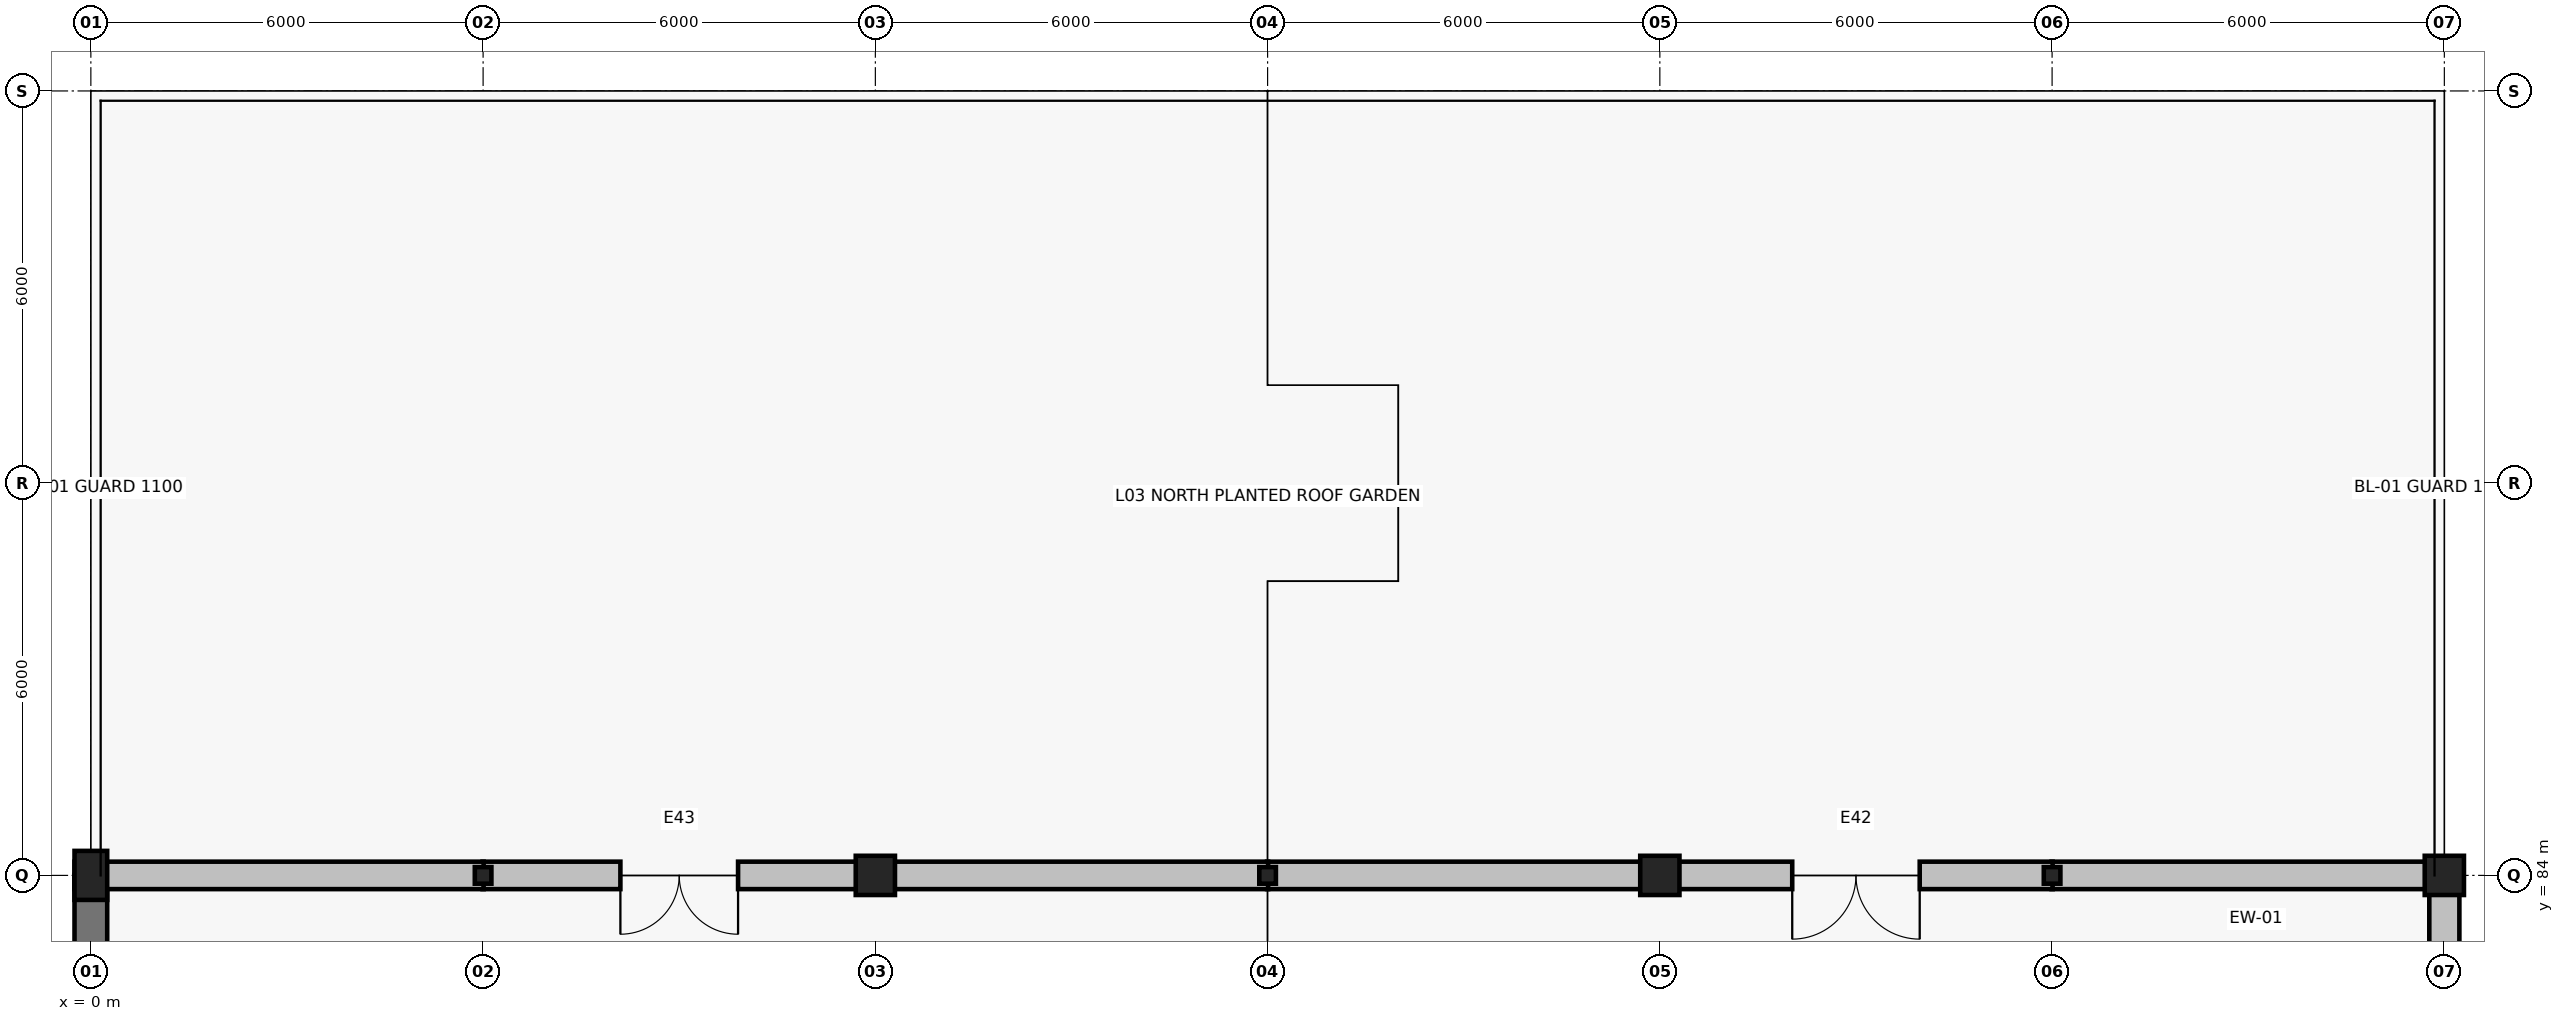
"""IFC4 building model, lengths in metres.
Left out: names, types, materials, properties, quantities, classifications, styles, units other than length and angle.
Written with IfcOpenShell. Run it as: python <this file> out.ifc"""

import sys

from ifc_helpers import new_model, si_unit, direction, frame, frame_2d, origin, origin_2d, place, context, subcontext, project, spatial, rectangle, hollow_rectangle, extrude, element, fill, save


model = new_model("IFC4")
c1 = context("Model", 3, precision=1e-05, world=origin(), true_north=direction((0.0, 1.0)))
c2 = subcontext(c1, "Body", "Model", "MODEL_VIEW")
j1 = project(units=[si_unit("LENGTHUNIT", "METRE"), si_unit("PLANEANGLEUNIT", "RADIAN")], contexts=[c1])
p1 = place(None, origin())
s1 = spatial("IfcSite", under=j1, at=p1, CompositionType="ELEMENT")
p2 = place(p1, origin())
s2 = spatial("IfcBuilding", under=s1, at=p2, CompositionType="ELEMENT")
p3 = place(p2, frame((0.0, 0.0, 11.4)))
s3 = spatial("IfcBuildingStorey", under=s2, at=p3, CompositionType="ELEMENT", Elevation=11.4)
p4 = place(p3, frame((0.0, 84.0, 0.0), z_axis=(0.0, 0.0, 1.0), x_axis=(1.0, 0.0, 0.0)))
e1 = element("IfcColumn", 1, at=p4, inside=s3, PredefinedType="PILASTER", context=c2, shape_type="SweptSolid", body=[
    extrude(rectangle(XDim=0.5, YDim=0.75, at=origin_2d()), origin(), (0.0, 0.0, 1.0), 4.0),
])
p5 = place(p3, frame((6.0, 84.0, 0.0), z_axis=(0.0, 0.0, 1.0), x_axis=(1.0, 0.0, 0.0)))
e2 = element("IfcColumn", 2, at=p5, inside=s3, PredefinedType="COLUMN", context=c2, shape_type="SweptSolid", body=[
    extrude(hollow_rectangle(XDim=0.254, YDim=0.254, WallThickness=0.01, InnerFilletRadius=0.01, OuterFilletRadius=0.019, at=origin_2d()), origin(), (0.0, 0.0, 1.0), 4.0),
])
p6 = place(p3, frame((12.0, 84.0, 0.0), z_axis=(0.0, 0.0, 1.0), x_axis=(1.0, 0.0, 0.0)))
e3 = element("IfcColumn", 3, at=p6, inside=s3, PredefinedType="COLUMN", context=c2, shape_type="SweptSolid", body=[
    extrude(rectangle(XDim=0.6, YDim=0.6, at=origin_2d()), origin(), (0.0, 0.0, 1.0), 4.0),
])
p7 = place(p3, frame((18.0, 84.0, 0.0), z_axis=(0.0, 0.0, 1.0), x_axis=(1.0, 0.0, 0.0)))
e4 = element("IfcColumn", 4, at=p7, inside=s3, PredefinedType="COLUMN", context=c2, shape_type="SweptSolid", body=[
    extrude(hollow_rectangle(XDim=0.254, YDim=0.254, WallThickness=0.01, InnerFilletRadius=0.01, OuterFilletRadius=0.019, at=origin_2d()), origin(), (0.0, 0.0, 1.0), 4.0),
])
p8 = place(p3, frame((24.0, 84.0, 0.0), z_axis=(0.0, 0.0, 1.0), x_axis=(1.0, 0.0, 0.0)))
e5 = element("IfcColumn", 5, at=p8, inside=s3, PredefinedType="COLUMN", context=c2, shape_type="SweptSolid", body=[
    extrude(rectangle(XDim=0.6, YDim=0.6, at=origin_2d()), origin(), (0.0, 0.0, 1.0), 4.0),
])
p9 = place(p3, frame((30.0, 84.0, 0.0), z_axis=(0.0, 0.0, 1.0), x_axis=(1.0, 0.0, 0.0)))
e6 = element("IfcColumn", 6, at=p9, inside=s3, PredefinedType="COLUMN", context=c2, shape_type="SweptSolid", body=[
    extrude(hollow_rectangle(XDim=0.254, YDim=0.254, WallThickness=0.01, InnerFilletRadius=0.01, OuterFilletRadius=0.019, at=origin_2d()), origin(), (0.0, 0.0, 1.0), 4.0),
])
p10 = place(p3, frame((36.0, 84.0, 0.0), z_axis=(0.0, 0.0, 1.0), x_axis=(1.0, 0.0, 0.0)))
e7 = element("IfcColumn", 7, at=p10, inside=s3, PredefinedType="COLUMN", context=c2, shape_type="SweptSolid", body=[
    extrude(rectangle(XDim=0.6, YDim=0.6, at=origin_2d()), origin(), (0.0, 0.0, 1.0), 4.0),
])
p11 = place(p3, frame((0.0, -0.008, 0.0), z_axis=(0.0, 0.0, 1.0), x_axis=(0.0, 1.0, 0.0)))
e8 = element("IfcWall", 8, at=p11, inside=s3, PredefinedType="SOLIDWALL", context=c2, shape_type="SweptSolid", body=[
    extrude(rectangle(XDim=84.016, YDim=0.5, at=frame_2d((42.008, 0.0))), origin(), (0.0, 0.0, 1.0), 3.68),
])
p12 = place(p3, frame((36.0, 73.58, 0.0), z_axis=(0.0, 0.0, 1.0), x_axis=(0.0, 1.0, 0.0)))
e9 = element("IfcWall", 9, at=p12, inside=s3, PredefinedType="SOLIDWALL", context=c2, shape_type="SweptSolid", body=[
    extrude(rectangle(XDim=10.428, YDim=0.46, at=frame_2d((5.214, 0.0))), origin(), (0.0, 0.0, 1.0), 2.957),
])
p13 = place(p3, frame((36.25, 84.0, 0.0), z_axis=(0.0, 0.0, 1.0), x_axis=(-1.0, 0.0, 0.0)))
e10 = element("IfcWall", 10, at=p13, inside=s3, PredefinedType="SOLIDWALL", context=c2, shape_type="SweptSolid", body=[
    extrude(rectangle(XDim=6.258, YDim=0.42, at=frame_2d((3.129, 0.0))), origin(), (0.0, 0.0, 1.0), 2.957),
])
p14 = place(p3, frame((30.008, 84.0, 0.0), z_axis=(0.0, 0.0, 1.0), x_axis=(-1.0, 0.0, 0.0)))
e11 = element("IfcWall", 11, at=p14, inside=s3, PredefinedType="SOLIDWALL", context=c2, shape_type="SweptSolid", body=[
    extrude(rectangle(XDim=6.016, YDim=0.42, at=frame_2d((3.008, 0.0))), origin(), (0.0, 0.0, 1.0), 2.957),
])
p15 = place(p14, frame((2.033, 0.0, 0.0)))
e12 = element("IfcOpeningElement", 12, at=p15, cuts=e11, PredefinedType="OPENING", context=c2, shape_type="SweptSolid", body=[
    extrude(rectangle(XDim=1.95, YDim=2.3, at=frame_2d((0.975, 1.15))), frame((0.0, 0.225, 0.0), z_axis=(0.0, -1.0, 0.0), x_axis=(1.0, 0.0, 0.0)), (0.0, 0.0, 1.0), 0.45),
])
for number, where, z_axis, x_axis in (
    (13, (24.008, 84.0, 0.0), (0.0, 0.0, 1.0), (-1.0, 0.0, 0.0)),
    (14, (18.008, 84.0, 0.0), (0.0, 0.0, 1.0), (-1.0, 0.0, 0.0)),
):
    element("IfcWall", number, at=place(p3, frame(where, z_axis=z_axis, x_axis=x_axis)), inside=s3, PredefinedType="SOLIDWALL", context=c2, shape_type="SweptSolid", body=[
        extrude(rectangle(XDim=6.016, YDim=0.42, at=frame_2d((3.008, 0.0))), origin(), (0.0, 0.0, 1.0), 2.957),
    ])
p16 = place(p3, frame((12.008, 84.0, 0.0), z_axis=(0.0, 0.0, 1.0), x_axis=(-1.0, 0.0, 0.0)))
e15 = element("IfcWall", 15, at=p16, inside=s3, PredefinedType="SOLIDWALL", context=c2, shape_type="SweptSolid", body=[
    extrude(rectangle(XDim=6.016, YDim=0.42, at=frame_2d((3.008, 0.0))), origin(), (0.0, 0.0, 1.0), 2.957),
])
p17 = place(p16, frame((2.108, 0.0, 0.0)))
e16 = element("IfcOpeningElement", 16, at=p17, cuts=e15, PredefinedType="OPENING", context=c2, shape_type="SweptSolid", body=[
    extrude(rectangle(XDim=1.8, YDim=2.25, at=frame_2d((0.9, 1.125))), frame((0.0, 0.225, 0.0), z_axis=(0.0, -1.0, 0.0), x_axis=(1.0, 0.0, 0.0)), (0.0, 0.0, 1.0), 0.45),
])
p18 = place(p3, frame((6.008, 84.0, 0.0), z_axis=(0.0, 0.0, 1.0), x_axis=(-1.0, 0.0, 0.0)))
e17 = element("IfcWall", 17, at=p18, inside=s3, PredefinedType="SOLIDWALL", context=c2, shape_type="SweptSolid", body=[
    extrude(rectangle(XDim=6.258, YDim=0.42, at=frame_2d((3.129, 0.0))), origin(), (0.0, 0.0, 1.0), 2.957),
])
p19 = place(p15, origin())
e18 = element("IfcDoor", 18, at=p19, inside=s3, OperationType="DOUBLE_DOOR_SINGLE_SWING", PredefinedType="DOOR", context=c2, shape_type="SweptSolid", body=[
    extrude(rectangle(XDim=1.95, YDim=2.3, at=frame_2d((0.975, 1.15))), frame((0.0, 0.025, 0.0), z_axis=(0.0, -1.0, 0.0), x_axis=(1.0, 0.0, 0.0)), (0.0, 0.0, 1.0), 0.05),
])
fill(e12, e18)
p20 = place(p17, origin())
e19 = element("IfcDoor", 19, at=p20, inside=s3, OperationType="DOUBLE_DOOR_SINGLE_SWING", PredefinedType="DOOR", context=c2, shape_type="SweptSolid", body=[
    extrude(rectangle(XDim=1.8, YDim=2.25, at=frame_2d((0.9, 1.125))), frame((0.0, 0.025, 0.0), z_axis=(0.0, -1.0, 0.0), x_axis=(1.0, 0.0, 0.0)), (0.0, 0.0, 1.0), 0.05),
])
fill(e16, e19)
save(model, sys.argv[1])
